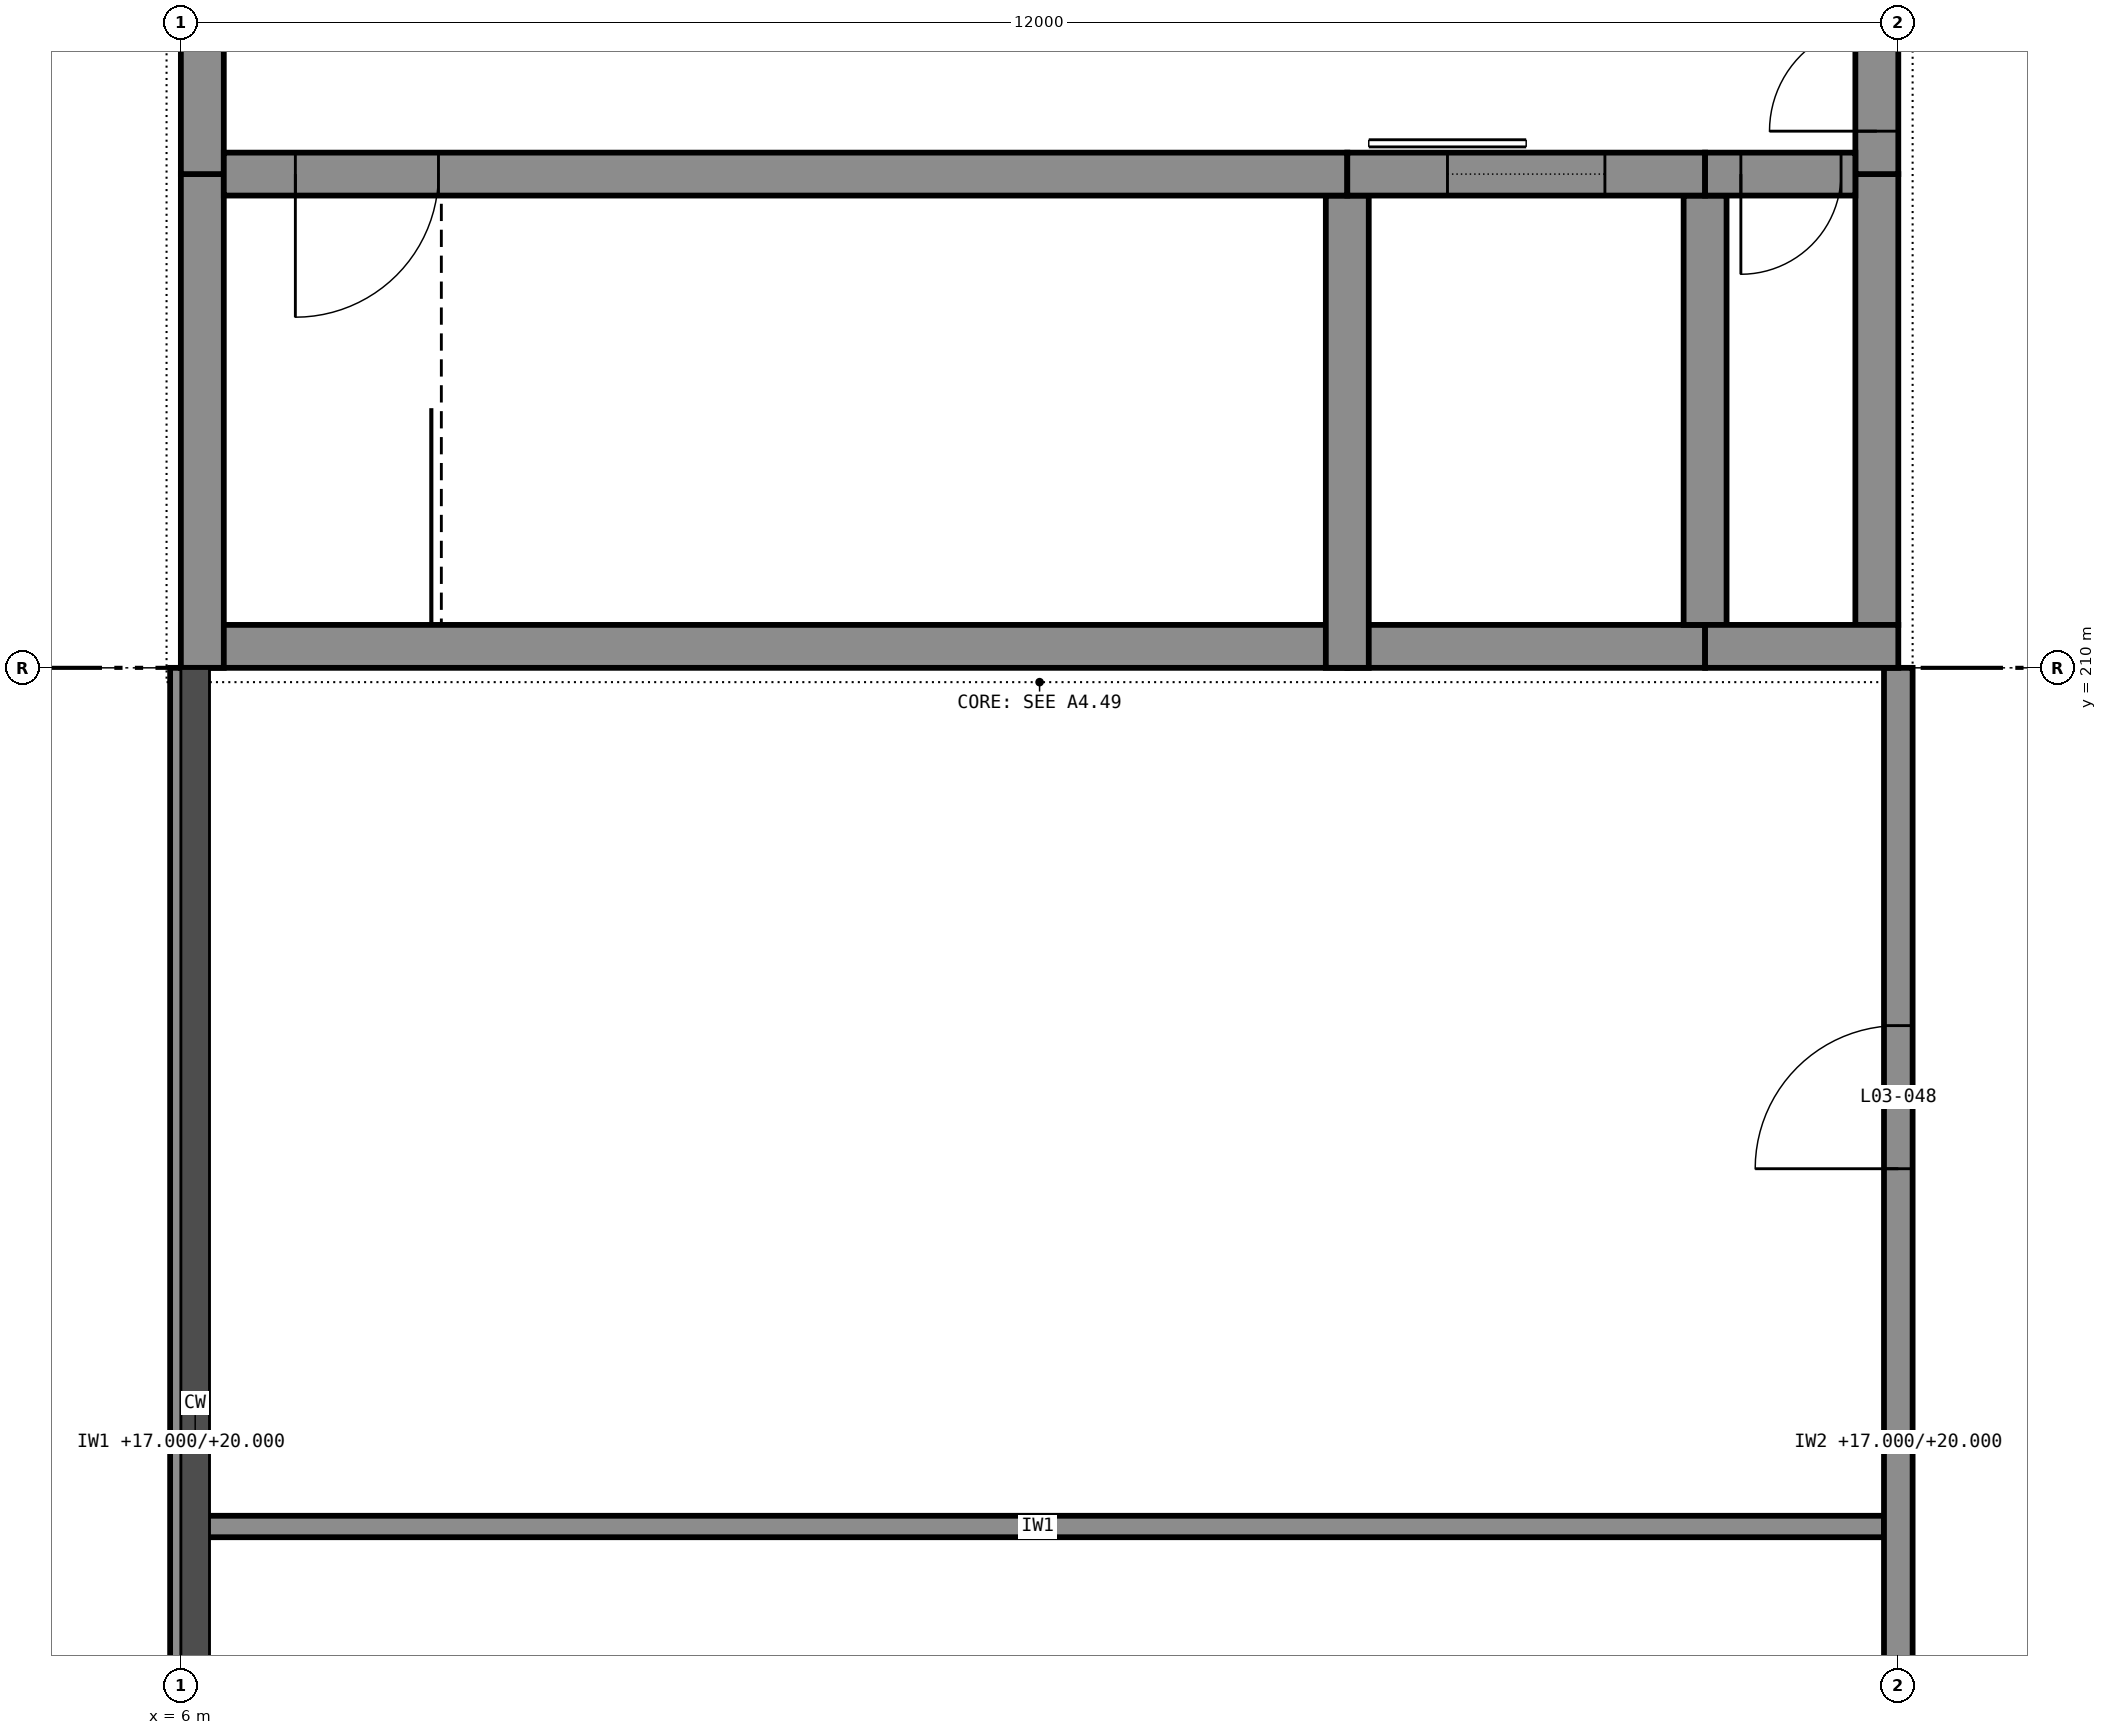
"""IFC4 building model, lengths in metres.
Left out: names, types, materials, properties, quantities, classifications, styles, units other than length and angle.
Written with IfcOpenShell. Run it as: python <this file> out.ifc"""

import sys

from ifc_helpers import new_model, si_unit, direction, frame, frame_2d, origin, place, context, subcontext, project, spatial, rectangle, extrude, element, fill, save


model = new_model("IFC4")
c1 = context("Model", 3, precision=1e-05, world=origin(), true_north=direction((0.0, 1.0)))
c2 = subcontext(c1, "Body", "Model", "MODEL_VIEW")
j1 = project(units=[si_unit("LENGTHUNIT", "METRE"), si_unit("PLANEANGLEUNIT", "RADIAN")], contexts=[c1])
p1 = place(None, origin())
s1 = spatial("IfcSite", under=j1, at=p1, CompositionType="ELEMENT")
p2 = place(p1, origin())
s2 = spatial("IfcBuilding", under=s1, at=p2, CompositionType="ELEMENT")
p3 = place(p2, frame((0.0, 0.0, 17.0)))
s3 = spatial("IfcBuildingStorey", under=s2, at=p3, CompositionType="ELEMENT", Elevation=17.0)
p4 = place(p3, frame((6.0, 210.15, 0.0), z_axis=(0.0, 0.0, 1.0), x_axis=(1.0, 0.0, 0.0)))
e1 = element("IfcWall", 1, at=p4, inside=s3, PredefinedType="SHEAR", context=c2, shape_type="SweptSolid", body=[
    extrude(rectangle(XDim=8.15, YDim=0.3, at=frame_2d((4.075, 0.0))), origin(), (0.0, 0.0, 1.0), 3.8),
])
p5 = place(p3, frame((14.15, 210.15, 0.0), z_axis=(0.0, 0.0, 1.0), x_axis=(1.0, 0.0, 0.0)))
e2 = element("IfcWall", 2, at=p5, inside=s3, PredefinedType="SHEAR", context=c2, shape_type="SweptSolid", body=[
    extrude(rectangle(XDim=2.5, YDim=0.3, at=frame_2d((1.25, 0.0))), origin(), (0.0, 0.0, 1.0), 3.8),
])
p6 = place(p3, frame((16.65, 210.15, 0.0), z_axis=(0.0, 0.0, 1.0), x_axis=(1.0, 0.0, 0.0)))
e3 = element("IfcWall", 3, at=p6, inside=s3, PredefinedType="SHEAR", context=c2, shape_type="SweptSolid", body=[
    extrude(rectangle(XDim=1.35, YDim=0.3, at=frame_2d((0.675, 0.0))), origin(), (0.0, 0.0, 1.0), 3.8),
])
p7 = place(p3, frame((6.3, 213.45, 0.0), z_axis=(0.0, 0.0, 1.0), x_axis=(1.0, 0.0, 0.0)))
e4 = element("IfcWall", 4, at=p7, inside=s3, PredefinedType="SHEAR", context=c2, shape_type="SweptSolid", body=[
    extrude(rectangle(XDim=7.85, YDim=0.3, at=frame_2d((3.925, 0.0))), origin(), (0.0, 0.0, 1.0), 3.8),
])
p8 = place(p7, frame((0.5, 0.0, 0.0)))
e5 = element("IfcOpeningElement", 5, at=p8, cuts=e4, PredefinedType="OPENING", context=c2, shape_type="SweptSolid", body=[
    extrude(rectangle(XDim=1.0, YDim=2.1, at=frame_2d((0.5, 1.05))), frame((0.0, 0.16, 0.0), z_axis=(0.0, -1.0, 0.0), x_axis=(1.0, 0.0, 0.0)), (0.0, 0.0, 1.0), 0.32),
])
p9 = place(p3, frame((14.15, 213.45, 0.0), z_axis=(0.0, 0.0, 1.0), x_axis=(1.0, 0.0, 0.0)))
e6 = element("IfcWall", 6, at=p9, inside=s3, PredefinedType="SHEAR", context=c2, shape_type="SweptSolid", body=[
    extrude(rectangle(XDim=2.5, YDim=0.3, at=frame_2d((1.25, 0.0))), origin(), (0.0, 0.0, 1.0), 3.8),
])
p10 = place(p9, frame((0.7, 0.0, 0.0)))
e7 = element("IfcOpeningElement", 7, at=p10, cuts=e6, PredefinedType="OPENING", context=c2, shape_type="SweptSolid", body=[
    extrude(rectangle(XDim=1.1, YDim=2.1, at=frame_2d((0.55, 1.05))), frame((0.0, 0.16, 0.0), z_axis=(0.0, -1.0, 0.0), x_axis=(1.0, 0.0, 0.0)), (0.0, 0.0, 1.0), 0.32),
])
p11 = place(p3, frame((16.65, 213.45, 0.0), z_axis=(0.0, 0.0, 1.0), x_axis=(1.0, 0.0, 0.0)))
e8 = element("IfcWall", 8, at=p11, inside=s3, PredefinedType="SHEAR", context=c2, shape_type="SweptSolid", body=[
    extrude(rectangle(XDim=1.05, YDim=0.3, at=frame_2d((0.525, 0.0))), origin(), (0.0, 0.0, 1.0), 3.8),
])
p12 = place(p11, frame((0.25, 0.0, 0.0)))
e9 = element("IfcOpeningElement", 9, at=p12, cuts=e8, PredefinedType="OPENING", context=c2, shape_type="SweptSolid", body=[
    extrude(rectangle(XDim=0.7, YDim=2.1, at=frame_2d((0.35, 1.05))), frame((0.0, 0.16, 0.0), z_axis=(0.0, -1.0, 0.0), x_axis=(1.0, 0.0, 0.0)), (0.0, 0.0, 1.0), 0.32),
])
p13 = place(p3, frame((6.15, 210.0, 0.0), z_axis=(0.0, 0.0, 1.0), x_axis=(0.0, 1.0, 0.0)))
e10 = element("IfcWall", 10, at=p13, inside=s3, PredefinedType="SHEAR", context=c2, shape_type="SweptSolid", body=[
    extrude(rectangle(XDim=3.45, YDim=0.3, at=frame_2d((1.725, 0.0))), origin(), (0.0, 0.0, 1.0), 3.8),
])
p14 = place(p3, frame((6.15, 213.45, 0.0), z_axis=(0.0, 0.0, 1.0), x_axis=(0.0, 1.0, 0.0)))
e11 = element("IfcWall", 11, at=p14, inside=s3, PredefinedType="SHEAR", context=c2, shape_type="SweptSolid", body=[
    extrude(rectangle(XDim=5.1, YDim=0.3, at=frame_2d((2.55, 0.0))), origin(), (0.0, 0.0, 1.0), 3.8),
])
p15 = place(p3, frame((17.85, 210.3, 0.0), z_axis=(0.0, 0.0, 1.0), x_axis=(0.0, 1.0, 0.0)))
e12 = element("IfcWall", 12, at=p15, inside=s3, PredefinedType="SHEAR", context=c2, shape_type="SweptSolid", body=[
    extrude(rectangle(XDim=3.15, YDim=0.3, at=frame_2d((1.575, 0.0))), origin(), (0.0, 0.0, 1.0), 3.8),
])
p16 = place(p3, frame((17.85, 213.45, 0.0), z_axis=(0.0, 0.0, 1.0), x_axis=(0.0, 1.0, 0.0)))
e13 = element("IfcWall", 13, at=p16, inside=s3, PredefinedType="SHEAR", context=c2, shape_type="SweptSolid", body=[
    extrude(rectangle(XDim=5.1, YDim=0.3, at=frame_2d((2.55, 0.0))), origin(), (0.0, 0.0, 1.0), 3.8),
])
p17 = place(p16, frame((0.3, 0.0, 0.0)))
e14 = element("IfcOpeningElement", 14, at=p17, cuts=e13, PredefinedType="OPENING", context=c2, shape_type="SweptSolid", body=[
    extrude(rectangle(XDim=1.5, YDim=2.1, at=frame_2d((0.75, 1.05))), frame((0.0, 0.16, 0.0), z_axis=(0.0, -1.0, 0.0), x_axis=(1.0, 0.0, 0.0)), (0.0, 0.0, 1.0), 0.32),
])
p18 = place(p3, frame((14.15, 210.0, 0.0), z_axis=(0.0, 0.0, 1.0), x_axis=(0.0, 1.0, 0.0)))
e15 = element("IfcWall", 15, at=p18, inside=s3, PredefinedType="SHEAR", context=c2, shape_type="SweptSolid", body=[
    extrude(rectangle(XDim=3.3, YDim=0.3, at=frame_2d((1.65, 0.0))), origin(), (0.0, 0.0, 1.0), 3.8),
])
p19 = place(p3, frame((16.65, 210.3, 0.0), z_axis=(0.0, 0.0, 1.0), x_axis=(0.0, 1.0, 0.0)))
e16 = element("IfcWall", 16, at=p19, inside=s3, PredefinedType="SHEAR", context=c2, shape_type="SweptSolid", body=[
    extrude(rectangle(XDim=3.0, YDim=0.3, at=frame_2d((1.5, 0.0))), origin(), (0.0, 0.0, 1.0), 3.8),
])
p20 = place(p3, frame((6.075, 204.0, 0.0), z_axis=(0.0, 0.0, 1.0), x_axis=(1.0, 0.0, 0.0)))
e17 = element("IfcWall", 17, at=p20, inside=s3, PredefinedType="PARTITIONING", context=c2, shape_type="SweptSolid", body=[
    extrude(rectangle(XDim=11.825, YDim=0.15, at=frame_2d((5.913, 0.0))), origin(), (0.0, 0.0, 1.0), 3.8),
])
p21 = place(p3, frame((6.0, 162.0, 0.0), z_axis=(0.0, 0.0, 1.0), x_axis=(0.0, 1.0, 0.0)))
e18 = element("IfcWall", 18, at=p21, inside=s3, PredefinedType="PARTITIONING", context=c2, shape_type="SweptSolid", body=[
    extrude(rectangle(XDim=48.0, YDim=0.15, at=frame_2d((24.0, 0.0))), origin(), (0.0, 0.0, 1.0), 3.0),
])
p22 = place(p3, frame((18.0, 162.0, 0.0), z_axis=(0.0, 0.0, 1.0), x_axis=(0.0, 1.0, 0.0)))
e19 = element("IfcWall", 19, at=p22, inside=s3, PredefinedType="PARTITIONING", context=c2, shape_type="SweptSolid", body=[
    extrude(rectangle(XDim=48.0, YDim=0.2, at=frame_2d((24.0, 0.0))), origin(), (0.0, 0.0, 1.0), 3.0),
])
p23 = place(p22, frame((2.5, 0.0, 0.0)))
e20 = element("IfcOpeningElement", 20, at=p23, cuts=e19, PredefinedType="OPENING", context=c2, shape_type="SweptSolid", body=[
    extrude(rectangle(XDim=1.0, YDim=2.1, at=frame_2d((0.5, 1.05))), frame((0.0, 0.11, 0.0), z_axis=(0.0, -1.0, 0.0), x_axis=(1.0, 0.0, 0.0)), (0.0, 0.0, 1.0), 0.22),
])
p24 = place(p22, frame((8.5, 0.0, 0.0)))
e21 = element("IfcOpeningElement", 21, at=p24, cuts=e19, PredefinedType="OPENING", context=c2, shape_type="SweptSolid", body=[
    extrude(rectangle(XDim=1.0, YDim=2.1, at=frame_2d((0.5, 1.05))), frame((0.0, 0.11, 0.0), z_axis=(0.0, -1.0, 0.0), x_axis=(1.0, 0.0, 0.0)), (0.0, 0.0, 1.0), 0.22),
])
p25 = place(p22, frame((14.5, 0.0, 0.0)))
e22 = element("IfcOpeningElement", 22, at=p25, cuts=e19, PredefinedType="OPENING", context=c2, shape_type="SweptSolid", body=[
    extrude(rectangle(XDim=1.0, YDim=2.1, at=frame_2d((0.5, 1.05))), frame((0.0, 0.11, 0.0), z_axis=(0.0, -1.0, 0.0), x_axis=(1.0, 0.0, 0.0)), (0.0, 0.0, 1.0), 0.22),
])
p26 = place(p22, frame((20.5, 0.0, 0.0)))
e23 = element("IfcOpeningElement", 23, at=p26, cuts=e19, PredefinedType="OPENING", context=c2, shape_type="SweptSolid", body=[
    extrude(rectangle(XDim=1.0, YDim=2.1, at=frame_2d((0.5, 1.05))), frame((0.0, 0.11, 0.0), z_axis=(0.0, -1.0, 0.0), x_axis=(1.0, 0.0, 0.0)), (0.0, 0.0, 1.0), 0.22),
])
p27 = place(p22, frame((26.5, 0.0, 0.0)))
e24 = element("IfcOpeningElement", 24, at=p27, cuts=e19, PredefinedType="OPENING", context=c2, shape_type="SweptSolid", body=[
    extrude(rectangle(XDim=1.0, YDim=2.1, at=frame_2d((0.5, 1.05))), frame((0.0, 0.11, 0.0), z_axis=(0.0, -1.0, 0.0), x_axis=(1.0, 0.0, 0.0)), (0.0, 0.0, 1.0), 0.22),
])
p28 = place(p22, frame((32.5, 0.0, 0.0)))
e25 = element("IfcOpeningElement", 25, at=p28, cuts=e19, PredefinedType="OPENING", context=c2, shape_type="SweptSolid", body=[
    extrude(rectangle(XDim=1.0, YDim=2.1, at=frame_2d((0.5, 1.05))), frame((0.0, 0.11, 0.0), z_axis=(0.0, -1.0, 0.0), x_axis=(1.0, 0.0, 0.0)), (0.0, 0.0, 1.0), 0.22),
])
p29 = place(p22, frame((38.5, 0.0, 0.0)))
e26 = element("IfcOpeningElement", 26, at=p29, cuts=e19, PredefinedType="OPENING", context=c2, shape_type="SweptSolid", body=[
    extrude(rectangle(XDim=1.0, YDim=2.1, at=frame_2d((0.5, 1.05))), frame((0.0, 0.11, 0.0), z_axis=(0.0, -1.0, 0.0), x_axis=(1.0, 0.0, 0.0)), (0.0, 0.0, 1.0), 0.22),
])
p30 = place(p22, frame((44.5, 0.0, 0.0)))
e27 = element("IfcOpeningElement", 27, at=p30, cuts=e19, PredefinedType="OPENING", context=c2, shape_type="SweptSolid", body=[
    extrude(rectangle(XDim=1.0, YDim=2.1, at=frame_2d((0.5, 1.05))), frame((0.0, 0.11, 0.0), z_axis=(0.0, -1.0, 0.0), x_axis=(1.0, 0.0, 0.0)), (0.0, 0.0, 1.0), 0.22),
])
p31 = place(p30, origin())
e28 = element("IfcDoor", 28, at=p31, inside=s3, OperationType="SINGLE_SWING_RIGHT", PredefinedType="DOOR", context=c2, shape_type="SweptSolid", body=[
    extrude(rectangle(XDim=1.0, YDim=2.1, at=frame_2d((0.5, 1.05))), frame((0.0, 0.025, 0.0), z_axis=(0.0, -1.0, 0.0), x_axis=(1.0, 0.0, 0.0)), (0.0, 0.0, 1.0), 0.05),
])
fill(e27, e28)
p32 = place(p8, frame((1.0, 0.0, 0.0), z_axis=(0.0, 0.0, 1.0), x_axis=(-1.0, 0.0, 0.0)))
e29 = element("IfcDoor", 29, at=p32, inside=s3, OperationType="SINGLE_SWING_LEFT", PredefinedType="DOOR", context=c2, shape_type="SweptSolid", body=[
    extrude(rectangle(XDim=1.0, YDim=2.1, at=frame_2d((0.5, 1.05))), frame((0.0, 0.025, 0.0), z_axis=(0.0, -1.0, 0.0), x_axis=(1.0, 0.0, 0.0)), (0.0, 0.0, 1.0), 0.05),
])
fill(e5, e29)
p33 = place(p10, origin())
e30 = element("IfcDoor", 30, at=p33, inside=s3, OperationType="SLIDING_TO_LEFT", PredefinedType="DOOR", context=c2, shape_type="SweptSolid", body=[
    extrude(rectangle(XDim=1.1, YDim=2.1, at=frame_2d((0.55, 1.05))), frame((0.0, 0.025, 0.0), z_axis=(0.0, -1.0, 0.0), x_axis=(1.0, 0.0, 0.0)), (0.0, 0.0, 1.0), 0.05),
])
fill(e7, e30)
p34 = place(p12, frame((0.7, 0.0, 0.0), z_axis=(0.0, 0.0, 1.0), x_axis=(-1.0, 0.0, 0.0)))
e31 = element("IfcDoor", 31, at=p34, inside=s3, OperationType="SINGLE_SWING_LEFT", PredefinedType="DOOR", context=c2, shape_type="SweptSolid", body=[
    extrude(rectangle(XDim=0.7, YDim=2.1, at=frame_2d((0.35, 1.05))), frame((0.0, 0.025, 0.0), z_axis=(0.0, -1.0, 0.0), x_axis=(1.0, 0.0, 0.0)), (0.0, 0.0, 1.0), 0.05),
])
fill(e9, e31)
p35 = place(p17, origin())
e32 = element("IfcDoor", 32, at=p35, inside=s3, OperationType="DOUBLE_DOOR_SINGLE_SWING", PredefinedType="DOOR", context=c2, shape_type="SweptSolid", body=[
    extrude(rectangle(XDim=1.5, YDim=2.1, at=frame_2d((0.75, 1.05))), frame((0.0, 0.025, 0.0), z_axis=(0.0, -1.0, 0.0), x_axis=(1.0, 0.0, 0.0)), (0.0, 0.0, 1.0), 0.05),
])
fill(e14, e32)
save(model, sys.argv[1])
